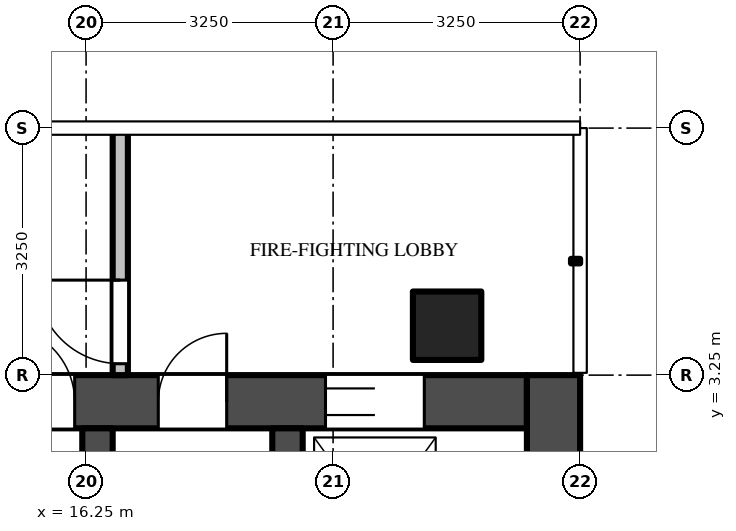
"""IFC4 building model, lengths in metres.
Left out: names, types, materials, properties, quantities, classifications, styles, units other than length and angle.
Written with IfcOpenShell. Run it as: python <this file> out.ifc"""

import sys

from ifc_helpers import new_model, si_unit, direction, frame, frame_2d, origin, origin_2d, place, context, subcontext, project, spatial, rectangle, extrude, source, transform, mapped, element, fill, save


model = new_model("IFC4")
c1 = context("Model", 3, precision=1e-05, world=origin(), true_north=direction((0.0, 1.0)))
c2 = subcontext(c1, "Body", "Model", "MODEL_VIEW")
j1 = project(units=[si_unit("LENGTHUNIT", "METRE"), si_unit("PLANEANGLEUNIT", "RADIAN")], contexts=[c1])
p1 = place(None, origin())
s1 = spatial("IfcSite", under=j1, at=p1, CompositionType="ELEMENT")
p2 = place(p1, origin())
s2 = spatial("IfcBuilding", under=s1, at=p2, CompositionType="ELEMENT")
p3 = place(p2, frame((0.0, 0.0, 346.1)))
s3 = spatial("IfcBuildingStorey", under=s2, at=p3, CompositionType="ELEMENT", Elevation=346.1)
m1 = source(origin(), c2, "Body", "SweptSolid", [
    extrude(rectangle(XDim=0.9, YDim=0.9, at=origin_2d()), origin(), (0.0, 0.0, 1.0), 4.0),
])
p4 = place(p3, frame((21.0, 3.9, 0.0), z_axis=(0.0, 0.0, 1.0), x_axis=(1.0, 0.0, 0.0)))
e1 = element("IfcColumn", 1, at=p4, inside=s3, PredefinedType="COLUMN", context=c2, shape_type="MappedRepresentation", body=[
    mapped(m1, transform((0.0, 0.0, 0.0))),
])
m2 = source(origin(), c2, "Body", "SweptSolid", [
    extrude(rectangle(XDim=14.85, YDim=0.7, at=frame_2d((7.425, 0.0))), origin(), (0.0, 0.0, 1.0), 3.75),
])
p5 = place(p3, frame((7.2, 2.9, 0.0), z_axis=(0.0, 0.0, 1.0), x_axis=(1.0, 0.0, 0.0)))
e2 = element("IfcWall", 2, at=p5, inside=s3, PredefinedType="SHEAR", context=c2, shape_type="MappedRepresentation", body=[
    mapped(m2, transform((0.0, 0.0, 0.0))),
])
m3 = source(origin(), c2, "Body", "SweptSolid", [
    extrude(rectangle(XDim=1.3, YDim=2.1, at=frame_2d((0.65, 1.05))), frame((0.0, 0.36, 0.0), z_axis=(0.0, -1.0, 0.0), x_axis=(1.0, 0.0, 0.0)), (0.0, 0.0, 1.0), 0.72),
])
p6 = place(p5, frame((12.2, 0.0, 0.0)))
e3 = element("IfcOpeningElement", 3, at=p6, cuts=e2, PredefinedType="OPENING", context=c2, shape_type="MappedRepresentation", body=[
    mapped(m3, transform((0.0, 0.0, 0.0))),
])
m4 = source(origin(), c2, "Body", "SweptSolid", [
    extrude(rectangle(XDim=1.0, YDim=2.1, at=frame_2d((0.5, 1.05))), frame((0.0, 0.36, 0.0), z_axis=(0.0, -1.0, 0.0), x_axis=(1.0, 0.0, 0.0)), (0.0, 0.0, 1.0), 0.72),
])
p7 = place(p5, frame((7.9, 0.0, 0.0)))
e4 = element("IfcOpeningElement", 4, at=p7, cuts=e2, PredefinedType="OPENING", context=c2, shape_type="MappedRepresentation", body=[
    mapped(m4, transform((0.0, 0.0, 0.0))),
])
m5 = source(origin(), c2, "Body", "SweptSolid", [
    extrude(rectangle(XDim=0.9, YDim=2.1, at=frame_2d((0.45, 1.05))), frame((0.0, 0.36, 0.0), z_axis=(0.0, -1.0, 0.0), x_axis=(1.0, 0.0, 0.0)), (0.0, 0.0, 1.0), 0.72),
])
p8 = place(p5, frame((1.363, 0.0, 0.0)))
e5 = element("IfcOpeningElement", 5, at=p8, cuts=e2, PredefinedType="OPENING", context=c2, shape_type="MappedRepresentation", body=[
    mapped(m5, transform((0.0, 0.0, 0.0))),
])
p9 = place(p5, frame((5.137, 0.0, 0.0)))
e6 = element("IfcOpeningElement", 6, at=p9, cuts=e2, PredefinedType="OPENING", context=c2, shape_type="MappedRepresentation", body=[
    mapped(m5, transform((0.0, 0.0, 0.0))),
])
p10 = place(p5, frame((10.0, 0.0, 0.0)))
e7 = element("IfcOpeningElement", 7, at=p10, cuts=e2, PredefinedType="OPENING", context=c2, shape_type="MappedRepresentation", body=[
    mapped(m5, transform((0.0, 0.0, 0.0))),
])
m6 = source(origin(), c2, "Body", "SweptSolid", [
    extrude(rectangle(XDim=9.05, YDim=0.7, at=frame_2d((4.525, 0.0))), origin(), (0.0, 0.0, 1.0), 3.75),
])
p11 = place(p3, frame((22.4, -5.8, 0.0), z_axis=(0.0, 0.0, 1.0), x_axis=(0.0, 1.0, 0.0)))
e8 = element("IfcWall", 8, at=p11, inside=s3, PredefinedType="SHEAR", context=c2, shape_type="MappedRepresentation", body=[
    mapped(m6, transform((0.0, 0.0, 0.0))),
])
m7 = source(origin(), c2, "Body", "SweptSolid", [
    extrude(rectangle(XDim=2.45, YDim=0.4, at=frame_2d((1.225, 0.0))), origin(), (0.0, 0.0, 1.0), 3.75),
])
for number, where, z_axis, x_axis in (
    (9, (16.4, 0.1, 0.0), (0.0, 0.0, 1.0), (0.0, 1.0, 0.0)),
    (10, (18.9, 0.1, 0.0), (0.0, 0.0, 1.0), (0.0, 1.0, 0.0)),
):
    element("IfcWall", number, at=place(p3, frame(where, z_axis=z_axis, x_axis=x_axis)), inside=s3, PredefinedType="SHEAR", context=c2, shape_type="MappedRepresentation", body=[
        mapped(m7, transform((0.0, 0.0, 0.0))),
    ])
m8 = source(origin(), c2, "Body", "SweptSolid", [
    extrude(rectangle(XDim=3.25, YDim=0.2, at=frame_2d((1.625, 0.0))), origin(), (0.0, 0.0, 1.0), 3.75),
])
p12 = place(p3, frame((16.7, 3.25, 0.0), z_axis=(0.0, 0.0, 1.0), x_axis=(0.0, 1.0, 0.0)))
e11 = element("IfcWall", 11, at=p12, inside=s3, PredefinedType="PARTITIONING", context=c2, shape_type="MappedRepresentation", body=[
    mapped(m8, transform((0.0, 0.0, 0.0))),
])
m9 = source(origin(), c2, "Body", "SweptSolid", [
    extrude(rectangle(XDim=1.1, YDim=2.1, at=frame_2d((0.55, 1.05))), frame((0.0, 0.11, 0.0), z_axis=(0.0, -1.0, 0.0), x_axis=(1.0, 0.0, 0.0)), (0.0, 0.0, 1.0), 0.22),
])
p13 = place(p12, frame((0.15, 0.0, 0.0)))
e12 = element("IfcOpeningElement", 12, at=p13, cuts=e11, PredefinedType="OPENING", context=c2, shape_type="MappedRepresentation", body=[
    mapped(m9, transform((0.0, 0.0, 0.0))),
])
m10 = source(origin(), c2, "Body", "SweptSolid", [
    extrude(rectangle(XDim=1.3, YDim=2.1, at=frame_2d((0.65, 1.05))), frame((0.0, -0.275, 0.0), z_axis=(0.0, -1.0, 0.0), x_axis=(1.0, 0.0, 0.0)), (0.0, 0.0, 1.0), 0.05),
])
p14 = place(p6, origin())
e13 = element("IfcDoor", 13, at=p14, inside=s3, OperationType="DOUBLE_DOOR_SLIDING", PredefinedType="DOOR", context=c2, shape_type="MappedRepresentation", body=[
    mapped(m10, transform((0.0, 0.0, 0.0))),
])
fill(e3, e13)
m11 = source(origin(), c2, "Body", "SweptSolid", [
    extrude(rectangle(XDim=1.0, YDim=2.1, at=frame_2d((0.5, 1.05))), frame((0.0, -0.275, 0.0), z_axis=(0.0, -1.0, 0.0), x_axis=(1.0, 0.0, 0.0)), (0.0, 0.0, 1.0), 0.05),
])
p15 = place(p7, origin())
e14 = element("IfcDoor", 14, at=p15, inside=s3, OperationType="SINGLE_SWING_LEFT", PredefinedType="DOOR", context=c2, shape_type="MappedRepresentation", body=[
    mapped(m11, transform((0.0, 0.0, 0.0))),
])
fill(e4, e14)
m12 = source(origin(), c2, "Body", "SweptSolid", [
    extrude(rectangle(XDim=1.1, YDim=2.1, at=frame_2d((0.55, 1.05))), frame((0.0, 0.025, 0.0), z_axis=(0.0, -1.0, 0.0), x_axis=(1.0, 0.0, 0.0)), (0.0, 0.0, 1.0), 0.05),
])
p16 = place(p13, origin())
e15 = element("IfcDoor", 15, at=p16, inside=s3, OperationType="SINGLE_SWING_RIGHT", PredefinedType="DOOR", context=c2, shape_type="MappedRepresentation", body=[
    mapped(m12, transform((0.0, 0.0, 0.0))),
])
fill(e12, e15)
m13 = source(origin(), c2, "Body", "SweptSolid", [
    extrude(rectangle(XDim=0.9, YDim=2.1, at=frame_2d((0.45, 1.05))), frame((0.0, -0.275, 0.0), z_axis=(0.0, -1.0, 0.0), x_axis=(1.0, 0.0, 0.0)), (0.0, 0.0, 1.0), 0.05),
])
p17 = place(p10, origin())
e16 = element("IfcDoor", 16, at=p17, inside=s3, OperationType="SINGLE_SWING_RIGHT", PredefinedType="DOOR", context=c2, shape_type="MappedRepresentation", body=[
    mapped(m13, transform((0.0, 0.0, 0.0))),
])
fill(e7, e16)
save(model, sys.argv[1])
